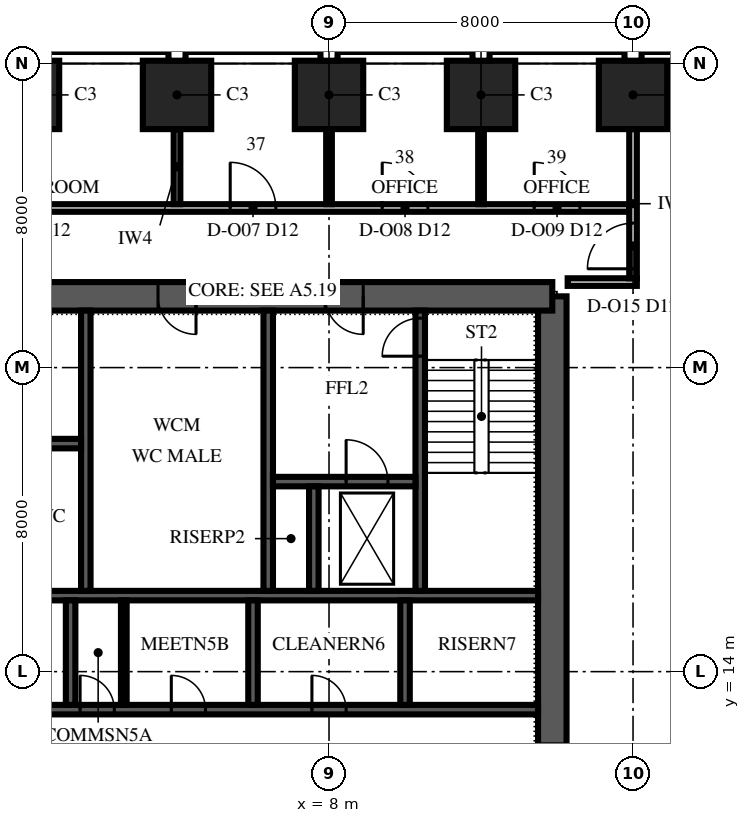
"""IFC4 building model, lengths in metres.
Left out: names, types, materials, properties, quantities, classifications, styles, units other than length and angle.
Written with IfcOpenShell. Run it as: python <this file> out.ifc"""

import sys

from ifc_helpers import new_model, si_unit, direction, frame, frame_2d, origin, origin_2d, place, context, subcontext, project, spatial, polyline, rectangle, outline, extrude, element, fill, save


model = new_model("IFC4")
c1 = context("Model", 3, precision=1e-05, world=origin(), true_north=direction((0.0, 1.0)))
c2 = subcontext(c1, "Body", "Model", "MODEL_VIEW")
j1 = project(units=[si_unit("LENGTHUNIT", "METRE"), si_unit("PLANEANGLEUNIT", "RADIAN")], contexts=[c1])
p1 = place(None, origin())
s1 = spatial("IfcSite", under=j1, at=p1, CompositionType="ELEMENT")
p2 = place(p1, origin())
s2 = spatial("IfcBuilding", under=s1, at=p2, CompositionType="ELEMENT")
p3 = place(p2, frame((0.0, 0.0, 127.0)))
s3 = spatial("IfcBuildingStorey", under=s2, at=p3, CompositionType="ELEMENT", Elevation=127.0)
for number, where, z_axis, x_axis in (
    (1, (16.0, 29.175, 0.0), (0.0, 0.0, 1.0), (-1.0, 0.0, 0.0)),
    (2, (12.0, 29.175, 0.0), (0.0, 0.0, 1.0), (-1.0, 0.0, 0.0)),
    (3, (8.0, 29.175, 0.0), (0.0, 0.0, 1.0), (-1.0, 0.0, 0.0)),
    (4, (4.0, 29.175, 0.0), (0.0, 0.0, 1.0), (-1.0, 0.0, 0.0)),
    (5, (0.0, 29.175, 0.0), (0.0, 0.0, 1.0), (-1.0, 0.0, 0.0)),
):
    element("IfcColumn", number, at=place(p3, frame(where, z_axis=z_axis, x_axis=x_axis)), inside=s3, PredefinedType="COLUMN", context=c2, shape_type="SweptSolid", body=[
        extrude(rectangle(XDim=1.8, YDim=1.8, at=origin_2d()), origin(), (0.0, 0.0, 1.0), 4.0),
    ])
p4 = place(p3, frame((13.875, 6.125, 0.0), z_axis=(0.0, 0.0, 1.0), x_axis=(0.0, 1.0, 0.0)))
e6 = element("IfcWall", 6, at=p4, inside=s3, PredefinedType="SHEAR", context=c2, shape_type="SweptSolid", body=[
    extrude(outline(polyline([(0.0, -0.375), (17.75, -0.375), (17.75, 0.0), (17.375, 0.0), (17.375, 0.375), (0.375, 0.375), (0.375, 0.0), (0.0, 0.0), (0.0, -0.375)])), origin(), (0.0, 0.0, 1.0), 4.0),
])
p5 = place(p4, frame((4.175, 0.0, 0.0)))
e7 = element("IfcOpeningElement", 7, at=p5, cuts=e6, PredefinedType="OPENING", context=c2, shape_type="SweptSolid", body=[
    extrude(rectangle(XDim=1.8, YDim=2.4, at=frame_2d((0.9, 1.2))), frame((0.0, 0.39, 0.0), z_axis=(0.0, -1.0, 0.0), x_axis=(1.0, 0.0, 0.0)), (0.0, 0.0, 1.0), 0.78),
])
p6 = place(p3, frame((13.875, 23.875, 0.0), z_axis=(0.0, 0.0, 1.0), x_axis=(-1.0, 0.0, 0.0)))
e8 = element("IfcWall", 8, at=p6, inside=s3, PredefinedType="SHEAR", context=c2, shape_type="SweptSolid", body=[
    extrude(rectangle(XDim=27.75, YDim=0.75, at=frame_2d((13.875, 0.0))), origin(), (0.0, 0.0, 1.0), 4.0),
])
p7 = place(p6, frame((21.775, 0.0, 0.0)))
e9 = element("IfcOpeningElement", 9, at=p7, cuts=e8, PredefinedType="OPENING", context=c2, shape_type="SweptSolid", body=[
    extrude(rectangle(XDim=1.0, YDim=2.1, at=frame_2d((0.5, 1.05))), frame((0.0, 0.39, 0.0), z_axis=(0.0, -1.0, 0.0), x_axis=(1.0, 0.0, 0.0)), (0.0, 0.0, 1.0), 0.78),
])
p8 = place(p6, frame((4.975, 0.0, 0.0)))
e10 = element("IfcOpeningElement", 10, at=p8, cuts=e8, PredefinedType="OPENING", context=c2, shape_type="SweptSolid", body=[
    extrude(rectangle(XDim=1.0, YDim=2.1, at=frame_2d((0.5, 1.05))), frame((0.0, 0.39, 0.0), z_axis=(0.0, -1.0, 0.0), x_axis=(1.0, 0.0, 0.0)), (0.0, 0.0, 1.0), 0.78),
])
p9 = place(p6, frame((17.375, 0.0, 0.0)))
e11 = element("IfcOpeningElement", 11, at=p9, cuts=e8, PredefinedType="OPENING", context=c2, shape_type="SweptSolid", body=[
    extrude(rectangle(XDim=1.0, YDim=2.1, at=frame_2d((0.5, 1.05))), frame((0.0, 0.39, 0.0), z_axis=(0.0, -1.0, 0.0), x_axis=(1.0, 0.0, 0.0)), (0.0, 0.0, 1.0), 0.78),
])
p10 = place(p6, frame((13.375, 0.0, 0.0)))
e12 = element("IfcOpeningElement", 12, at=p10, cuts=e8, PredefinedType="OPENING", context=c2, shape_type="SweptSolid", body=[
    extrude(rectangle(XDim=1.0, YDim=2.1, at=frame_2d((0.5, 1.05))), frame((0.0, 0.39, 0.0), z_axis=(0.0, -1.0, 0.0), x_axis=(1.0, 0.0, 0.0)), (0.0, 0.0, 1.0), 0.78),
])
p11 = place(p6, frame((9.375, 0.0, 0.0)))
e13 = element("IfcOpeningElement", 13, at=p11, cuts=e8, PredefinedType="OPENING", context=c2, shape_type="SweptSolid", body=[
    extrude(rectangle(XDim=1.0, YDim=2.1, at=frame_2d((0.5, 1.05))), frame((0.0, 0.39, 0.0), z_axis=(0.0, -1.0, 0.0), x_axis=(1.0, 0.0, 0.0)), (0.0, 0.0, 1.0), 0.78),
])
p12 = place(p3, frame((-13.5, 13.0, 0.0), z_axis=(0.0, 0.0, 1.0), x_axis=(1.0, 0.0, 0.0)))
e14 = element("IfcWall", 14, at=p12, inside=s3, PredefinedType="SHEAR", context=c2, shape_type="SweptSolid", body=[
    extrude(rectangle(XDim=27.0, YDim=0.25, at=frame_2d((13.5, 0.0))), origin(), (0.0, 0.0, 1.0), 4.0),
])
p13 = place(p12, frame((0.35, 0.0, 0.0)))
e15 = element("IfcOpeningElement", 15, at=p13, cuts=e14, PredefinedType="OPENING", context=c2, shape_type="SweptSolid", body=[
    extrude(rectangle(XDim=1.1, YDim=2.1, at=frame_2d((0.55, 1.05))), frame((0.0, 0.14, 0.0), z_axis=(0.0, -1.0, 0.0), x_axis=(1.0, 0.0, 0.0)), (0.0, 0.0, 1.0), 0.28),
])
p14 = place(p12, frame((3.15, 0.0, 0.0)))
e16 = element("IfcOpeningElement", 16, at=p14, cuts=e14, PredefinedType="OPENING", context=c2, shape_type="SweptSolid", body=[
    extrude(rectangle(XDim=1.1, YDim=2.1, at=frame_2d((0.55, 1.05))), frame((0.0, 0.14, 0.0), z_axis=(0.0, -1.0, 0.0), x_axis=(1.0, 0.0, 0.0)), (0.0, 0.0, 1.0), 0.28),
])
p15 = place(p12, frame((5.95, 0.0, 0.0)))
e17 = element("IfcOpeningElement", 17, at=p15, cuts=e14, PredefinedType="OPENING", context=c2, shape_type="SweptSolid", body=[
    extrude(rectangle(XDim=1.1, YDim=2.1, at=frame_2d((0.55, 1.05))), frame((0.0, 0.14, 0.0), z_axis=(0.0, -1.0, 0.0), x_axis=(1.0, 0.0, 0.0)), (0.0, 0.0, 1.0), 0.28),
])
p16 = place(p12, frame((14.95, 0.0, 0.0)))
e18 = element("IfcOpeningElement", 18, at=p16, cuts=e14, PredefinedType="OPENING", context=c2, shape_type="SweptSolid", body=[
    extrude(rectangle(XDim=0.9, YDim=2.1, at=frame_2d((0.45, 1.05))), frame((0.0, 0.14, 0.0), z_axis=(0.0, -1.0, 0.0), x_axis=(1.0, 0.0, 0.0)), (0.0, 0.0, 1.0), 0.28),
])
p17 = place(p12, frame((17.35, 0.0, 0.0)))
e19 = element("IfcOpeningElement", 19, at=p17, cuts=e14, PredefinedType="OPENING", context=c2, shape_type="SweptSolid", body=[
    extrude(rectangle(XDim=0.9, YDim=2.1, at=frame_2d((0.45, 1.05))), frame((0.0, 0.14, 0.0), z_axis=(0.0, -1.0, 0.0), x_axis=(1.0, 0.0, 0.0)), (0.0, 0.0, 1.0), 0.28),
])
p18 = place(p12, frame((21.05, 0.0, 0.0)))
e20 = element("IfcOpeningElement", 20, at=p18, cuts=e14, PredefinedType="OPENING", context=c2, shape_type="SweptSolid", body=[
    extrude(rectangle(XDim=0.9, YDim=2.1, at=frame_2d((0.45, 1.05))), frame((0.0, 0.14, 0.0), z_axis=(0.0, -1.0, 0.0), x_axis=(1.0, 0.0, 0.0)), (0.0, 0.0, 1.0), 0.28),
])
p19 = place(p3, frame((-13.5, 16.0, 0.0), z_axis=(0.0, 0.0, 1.0), x_axis=(1.0, 0.0, 0.0)))
e21 = element("IfcWall", 21, at=p19, inside=s3, PredefinedType="SHEAR", context=c2, shape_type="SweptSolid", body=[
    extrude(rectangle(XDim=27.0, YDim=0.25, at=frame_2d((13.5, 0.0))), origin(), (0.0, 0.0, 1.0), 4.0),
])
for number, where, z_axis, x_axis in (
    (22, (1.2, 13.125, 0.0), (0.0, 0.0, 1.0), (0.0, 1.0, 0.0)),
    (23, (6.0, 13.125, 0.0), (0.0, 0.0, 1.0), (0.0, 1.0, 0.0)),
    (24, (10.0, 13.125, 0.0), (0.0, 0.0, 1.0), (0.0, 1.0, 0.0)),
):
    element("IfcWall", number, at=place(p3, frame(where, z_axis=z_axis, x_axis=x_axis)), inside=s3, PredefinedType="SHEAR", context=c2, shape_type="SweptSolid", body=[
        extrude(rectangle(XDim=2.75, YDim=0.25, at=frame_2d((1.375, 0.0))), origin(), (0.0, 0.0, 1.0), 4.0),
    ])
for number, where, z_axis, x_axis in (
    (25, (1.6, 16.125, 0.0), (0.0, 0.0, 1.0), (0.0, 1.0, 0.0)),
    (26, (6.4, 16.125, 0.0), (0.0, 0.0, 1.0), (0.0, 1.0, 0.0)),
):
    element("IfcWall", number, at=place(p3, frame(where, z_axis=z_axis, x_axis=x_axis)), inside=s3, PredefinedType="SHEAR", context=c2, shape_type="SweptSolid", body=[
        extrude(rectangle(XDim=7.375, YDim=0.25, at=frame_2d((3.688, 0.0))), origin(), (0.0, 0.0, 1.0), 4.0),
    ])
p20 = place(p3, frame((10.4, 16.125, 0.0), z_axis=(0.0, 0.0, 1.0), x_axis=(0.0, 1.0, 0.0)))
e27 = element("IfcWall", 27, at=p20, inside=s3, PredefinedType="SHEAR", context=c2, shape_type="SweptSolid", body=[
    extrude(rectangle(XDim=7.375, YDim=0.25, at=frame_2d((3.688, 0.0))), origin(), (0.0, 0.0, 1.0), 4.0),
])
p21 = place(p20, frame((6.175, 0.0, 0.0)))
e28 = element("IfcOpeningElement", 28, at=p21, cuts=e27, PredefinedType="OPENING", context=c2, shape_type="SweptSolid", body=[
    extrude(rectangle(XDim=1.0, YDim=2.1, at=frame_2d((0.5, 1.05))), frame((0.0, 0.14, 0.0), z_axis=(0.0, -1.0, 0.0), x_axis=(1.0, 0.0, 0.0)), (0.0, 0.0, 1.0), 0.28),
])
p22 = place(p3, frame((6.525, 19.0, 0.0), z_axis=(0.0, 0.0, 1.0), x_axis=(1.0, 0.0, 0.0)))
e29 = element("IfcWall", 29, at=p22, inside=s3, PredefinedType="SHEAR", context=c2, shape_type="SweptSolid", body=[
    extrude(rectangle(XDim=3.75, YDim=0.25, at=frame_2d((1.875, 0.0))), origin(), (0.0, 0.0, 1.0), 4.0),
])
p23 = place(p22, frame((1.925, 0.0, 0.0)))
e30 = element("IfcOpeningElement", 30, at=p23, cuts=e29, PredefinedType="OPENING", context=c2, shape_type="SweptSolid", body=[
    extrude(rectangle(XDim=1.1, YDim=2.1, at=frame_2d((0.55, 1.05))), frame((0.0, 0.14, 0.0), z_axis=(0.0, -1.0, 0.0), x_axis=(1.0, 0.0, 0.0)), (0.0, 0.0, 1.0), 0.28),
])
p24 = place(p3, frame((7.6, 16.125, 0.0), z_axis=(0.0, 0.0, 1.0), x_axis=(0.0, 1.0, 0.0)))
e31 = element("IfcWall", 31, at=p24, inside=s3, PredefinedType="SHEAR", context=c2, shape_type="SweptSolid", body=[
    extrude(rectangle(XDim=2.75, YDim=0.25, at=frame_2d((1.375, 0.0))), origin(), (0.0, 0.0, 1.0), 4.0),
])
p25 = place(p3, frame((-1.475, 20.0, 0.0), z_axis=(0.0, 0.0, 1.0), x_axis=(1.0, 0.0, 0.0)))
e32 = element("IfcWall", 32, at=p25, inside=s3, PredefinedType="SHEAR", context=c2, shape_type="SweptSolid", body=[
    extrude(rectangle(XDim=2.95, YDim=0.25, at=frame_2d((1.475, 0.0))), origin(), (0.0, 0.0, 1.0), 4.0),
])
p26 = place(p3, frame((2.6, 13.125, 0.0), z_axis=(0.0, 0.0, 1.0), x_axis=(0.0, 1.0, 0.0)))
e33 = element("IfcWall", 33, at=p26, inside=s3, PredefinedType="PARTITIONING", context=c2, shape_type="SweptSolid", body=[
    extrude(rectangle(XDim=2.75, YDim=0.15, at=frame_2d((1.375, 0.0))), origin(), (0.0, 0.0, 1.0), 3.85),
])
p27 = place(p3, frame((14.28, 24.25, 0.0), z_axis=(0.0, 0.0, 1.0), x_axis=(1.0, 0.0, 0.0)))
e34 = element("IfcWall", 34, at=p27, inside=s3, PredefinedType="PARTITIONING", context=c2, shape_type="SweptSolid", body=[
    extrude(rectangle(XDim=1.82, YDim=0.2, at=frame_2d((0.91, 0.0))), origin(), (0.0, 0.0, 1.0), 3.4),
])
p28 = place(p3, frame((-16.3, 26.2, 0.0), z_axis=(0.0, 0.0, 1.0), x_axis=(1.0, 0.0, 0.0)))
e35 = element("IfcWall", 35, at=p28, inside=s3, PredefinedType="PARTITIONING", context=c2, shape_type="SweptSolid", body=[
    extrude(rectangle(XDim=32.2, YDim=0.2, at=frame_2d((16.1, 0.0))), origin(), (0.0, 0.0, 1.0), 3.4),
])
p29 = place(p28, frame((1.7, 0.0, 0.0)))
e36 = element("IfcOpeningElement", 36, at=p29, cuts=e35, PredefinedType="OPENING", context=c2, shape_type="SweptSolid", body=[
    extrude(rectangle(XDim=1.2, YDim=2.4, at=frame_2d((0.6, 1.2))), frame((0.0, 0.115, 0.0), z_axis=(0.0, -1.0, 0.0), x_axis=(1.0, 0.0, 0.0)), (0.0, 0.0, 1.0), 0.23),
])
p30 = place(p28, frame((5.7, 0.0, 0.0)))
e37 = element("IfcOpeningElement", 37, at=p30, cuts=e35, PredefinedType="OPENING", context=c2, shape_type="SweptSolid", body=[
    extrude(rectangle(XDim=1.2, YDim=2.4, at=frame_2d((0.6, 1.2))), frame((0.0, 0.115, 0.0), z_axis=(0.0, -1.0, 0.0), x_axis=(1.0, 0.0, 0.0)), (0.0, 0.0, 1.0), 0.23),
])
p31 = place(p28, frame((9.7, 0.0, 0.0)))
e38 = element("IfcOpeningElement", 38, at=p31, cuts=e35, PredefinedType="OPENING", context=c2, shape_type="SweptSolid", body=[
    extrude(rectangle(XDim=1.2, YDim=2.4, at=frame_2d((0.6, 1.2))), frame((0.0, 0.115, 0.0), z_axis=(0.0, -1.0, 0.0), x_axis=(1.0, 0.0, 0.0)), (0.0, 0.0, 1.0), 0.23),
])
p32 = place(p28, frame((15.7, 0.0, 0.0)))
e39 = element("IfcOpeningElement", 39, at=p32, cuts=e35, PredefinedType="OPENING", context=c2, shape_type="SweptSolid", body=[
    extrude(rectangle(XDim=1.2, YDim=2.4, at=frame_2d((0.6, 1.2))), frame((0.0, 0.115, 0.0), z_axis=(0.0, -1.0, 0.0), x_axis=(1.0, 0.0, 0.0)), (0.0, 0.0, 1.0), 0.23),
])
p33 = place(p28, frame((21.7, 0.0, 0.0)))
e40 = element("IfcOpeningElement", 40, at=p33, cuts=e35, PredefinedType="OPENING", context=c2, shape_type="SweptSolid", body=[
    extrude(rectangle(XDim=1.2, YDim=2.4, at=frame_2d((0.6, 1.2))), frame((0.0, 0.115, 0.0), z_axis=(0.0, -1.0, 0.0), x_axis=(1.0, 0.0, 0.0)), (0.0, 0.0, 1.0), 0.23),
])
p34 = place(p28, frame((25.7, 0.0, 0.0)))
e41 = element("IfcOpeningElement", 41, at=p34, cuts=e35, PredefinedType="OPENING", context=c2, shape_type="SweptSolid", body=[
    extrude(rectangle(XDim=1.2, YDim=2.4, at=frame_2d((0.6, 1.2))), frame((0.0, 0.115, 0.0), z_axis=(0.0, -1.0, 0.0), x_axis=(1.0, 0.0, 0.0)), (0.0, 0.0, 1.0), 0.23),
])
p35 = place(p28, frame((29.7, 0.0, 0.0)))
e42 = element("IfcOpeningElement", 42, at=p35, cuts=e35, PredefinedType="OPENING", context=c2, shape_type="SweptSolid", body=[
    extrude(rectangle(XDim=1.2, YDim=2.4, at=frame_2d((0.6, 1.2))), frame((0.0, 0.115, 0.0), z_axis=(0.0, -1.0, 0.0), x_axis=(1.0, 0.0, 0.0)), (0.0, 0.0, 1.0), 0.23),
])
p36 = place(p3, frame((4.0, 26.3, 0.0), z_axis=(0.0, 0.0, 1.0), x_axis=(0.0, 1.0, 0.0)))
e43 = element("IfcWall", 43, at=p36, inside=s3, PredefinedType="PARTITIONING", context=c2, shape_type="SweptSolid", body=[
    extrude(rectangle(XDim=1.975, YDim=0.175, at=frame_2d((0.987, 0.0))), origin(), (0.0, 0.0, 1.0), 3.85),
])
for number, where, z_axis, x_axis in (
    (44, (8.0, 26.3, 0.0), (0.0, 0.0, 1.0), (0.0, 1.0, 0.0)),
    (45, (12.0, 26.3, 0.0), (0.0, 0.0, 1.0), (0.0, 1.0, 0.0)),
):
    element("IfcWall", number, at=place(p3, frame(where, z_axis=z_axis, x_axis=x_axis)), inside=s3, PredefinedType="PARTITIONING", context=c2, shape_type="SweptSolid", body=[
        extrude(rectangle(XDim=1.975, YDim=0.15, at=frame_2d((0.987, 0.0))), origin(), (0.0, 0.0, 1.0), 3.4),
    ])
p37 = place(p3, frame((16.0, 24.35, 0.0), z_axis=(0.0, 0.0, 1.0), x_axis=(0.0, 1.0, 0.0)))
e46 = element("IfcWall", 46, at=p37, inside=s3, PredefinedType="PARTITIONING", context=c2, shape_type="SweptSolid", body=[
    extrude(rectangle(XDim=3.925, YDim=0.2, at=frame_2d((1.962, 0.0))), origin(), (0.0, 0.0, 1.0), 3.4),
])
p38 = place(p37, frame((0.25, 0.0, 0.0)))
e47 = element("IfcOpeningElement", 47, at=p38, cuts=e46, PredefinedType="OPENING", context=c2, shape_type="SweptSolid", body=[
    extrude(rectangle(XDim=1.2, YDim=2.4, at=frame_2d((0.6, 1.2))), frame((0.0, 0.115, 0.0), z_axis=(0.0, -1.0, 0.0), x_axis=(1.0, 0.0, 0.0)), (0.0, 0.0, 1.0), 0.23),
])
p39 = place(p8, origin())
e48 = element("IfcDoor", 48, at=p39, inside=s3, OperationType="SINGLE_SWING_RIGHT", PredefinedType="DOOR", context=c2, shape_type="SweptSolid", body=[
    extrude(rectangle(XDim=1.0, YDim=2.1, at=frame_2d((0.5, 1.05))), frame((0.0, 0.375, 0.0), z_axis=(0.0, -1.0, 0.0), x_axis=(1.0, 0.0, 0.0)), (0.0, 0.0, 1.0), 0.75),
])
fill(e10, e48)
p40 = place(p11, origin())
e49 = element("IfcDoor", 49, at=p40, inside=s3, OperationType="SINGLE_SWING_LEFT", PredefinedType="DOOR", context=c2, shape_type="SweptSolid", body=[
    extrude(rectangle(XDim=1.0, YDim=2.1, at=frame_2d((0.5, 1.05))), frame((0.0, 0.375, 0.0), z_axis=(0.0, -1.0, 0.0), x_axis=(1.0, 0.0, 0.0)), (0.0, 0.0, 1.0), 0.75),
])
fill(e13, e49)
p41 = place(p21, origin())
e50 = element("IfcDoor", 50, at=p41, inside=s3, OperationType="SINGLE_SWING_LEFT", PredefinedType="DOOR", context=c2, shape_type="SweptSolid", body=[
    extrude(rectangle(XDim=1.0, YDim=2.1, at=frame_2d((0.5, 1.05))), frame((0.0, 0.125, 0.0), z_axis=(0.0, -1.0, 0.0), x_axis=(1.0, 0.0, 0.0)), (0.0, 0.0, 1.0), 0.25),
])
fill(e28, e50)
p42 = place(p23, origin())
e51 = element("IfcDoor", 51, at=p42, inside=s3, OperationType="SLIDING_TO_RIGHT", PredefinedType="DOOR", context=c2, shape_type="SweptSolid", body=[
    extrude(rectangle(XDim=1.1, YDim=2.1, at=frame_2d((0.55, 1.05))), frame((0.0, 0.125, 0.0), z_axis=(0.0, -1.0, 0.0), x_axis=(1.0, 0.0, 0.0)), (0.0, 0.0, 1.0), 0.25),
])
fill(e30, e51)
p43 = place(p16, origin())
e52 = element("IfcDoor", 52, at=p43, inside=s3, OperationType="SINGLE_SWING_LEFT", PredefinedType="DOOR", context=c2, shape_type="SweptSolid", body=[
    extrude(rectangle(XDim=0.9, YDim=2.1, at=frame_2d((0.45, 1.05))), frame((0.0, 0.125, 0.0), z_axis=(0.0, -1.0, 0.0), x_axis=(1.0, 0.0, 0.0)), (0.0, 0.0, 1.0), 0.25),
])
fill(e18, e52)
p44 = place(p17, origin())
e53 = element("IfcDoor", 53, at=p44, inside=s3, OperationType="SINGLE_SWING_LEFT", PredefinedType="DOOR", context=c2, shape_type="SweptSolid", body=[
    extrude(rectangle(XDim=0.9, YDim=2.1, at=frame_2d((0.45, 1.05))), frame((0.0, 0.125, 0.0), z_axis=(0.0, -1.0, 0.0), x_axis=(1.0, 0.0, 0.0)), (0.0, 0.0, 1.0), 0.25),
])
fill(e19, e53)
p45 = place(p18, origin())
e54 = element("IfcDoor", 54, at=p45, inside=s3, OperationType="SINGLE_SWING_LEFT", PredefinedType="DOOR", context=c2, shape_type="SweptSolid", body=[
    extrude(rectangle(XDim=0.9, YDim=2.1, at=frame_2d((0.45, 1.05))), frame((0.0, 0.125, 0.0), z_axis=(0.0, -1.0, 0.0), x_axis=(1.0, 0.0, 0.0)), (0.0, 0.0, 1.0), 0.25),
])
fill(e20, e54)
p46 = place(p33, origin())
e55 = element("IfcDoor", 55, at=p46, inside=s3, OperationType="SINGLE_SWING_LEFT", PredefinedType="DOOR", context=c2, shape_type="SweptSolid", body=[
    extrude(rectangle(XDim=1.2, YDim=2.4, at=frame_2d((0.6, 1.2))), frame((0.0, 0.1, 0.0), z_axis=(0.0, -1.0, 0.0), x_axis=(1.0, 0.0, 0.0)), (0.0, 0.0, 1.0), 0.199),
])
fill(e40, e55)
p47 = place(p34, origin())
e56 = element("IfcDoor", 56, at=p47, inside=s3, OperationType="SINGLE_SWING_LEFT", PredefinedType="DOOR", context=c2, shape_type="SweptSolid", body=[
    extrude(rectangle(XDim=1.2, YDim=2.4, at=frame_2d((0.6, 1.2))), frame((0.0, 0.1, 0.0), z_axis=(0.0, -1.0, 0.0), x_axis=(1.0, 0.0, 0.0)), (0.0, 0.0, 1.0), 0.199),
])
fill(e41, e56)
p48 = place(p35, origin())
e57 = element("IfcDoor", 57, at=p48, inside=s3, OperationType="SINGLE_SWING_LEFT", PredefinedType="DOOR", context=c2, shape_type="SweptSolid", body=[
    extrude(rectangle(XDim=1.2, YDim=2.4, at=frame_2d((0.6, 1.2))), frame((0.0, 0.1, 0.0), z_axis=(0.0, -1.0, 0.0), x_axis=(1.0, 0.0, 0.0)), (0.0, 0.0, 1.0), 0.199),
])
fill(e42, e57)
p49 = place(p38, origin())
e58 = element("IfcDoor", 58, at=p49, inside=s3, OperationType="SINGLE_SWING_LEFT", PredefinedType="DOOR", context=c2, shape_type="SweptSolid", body=[
    extrude(rectangle(XDim=1.2, YDim=2.4, at=frame_2d((0.6, 1.2))), frame((0.0, 0.1, 0.0), z_axis=(0.0, -1.0, 0.0), x_axis=(1.0, 0.0, 0.0)), (0.0, 0.0, 1.0), 0.199),
])
fill(e47, e58)
save(model, sys.argv[1])
